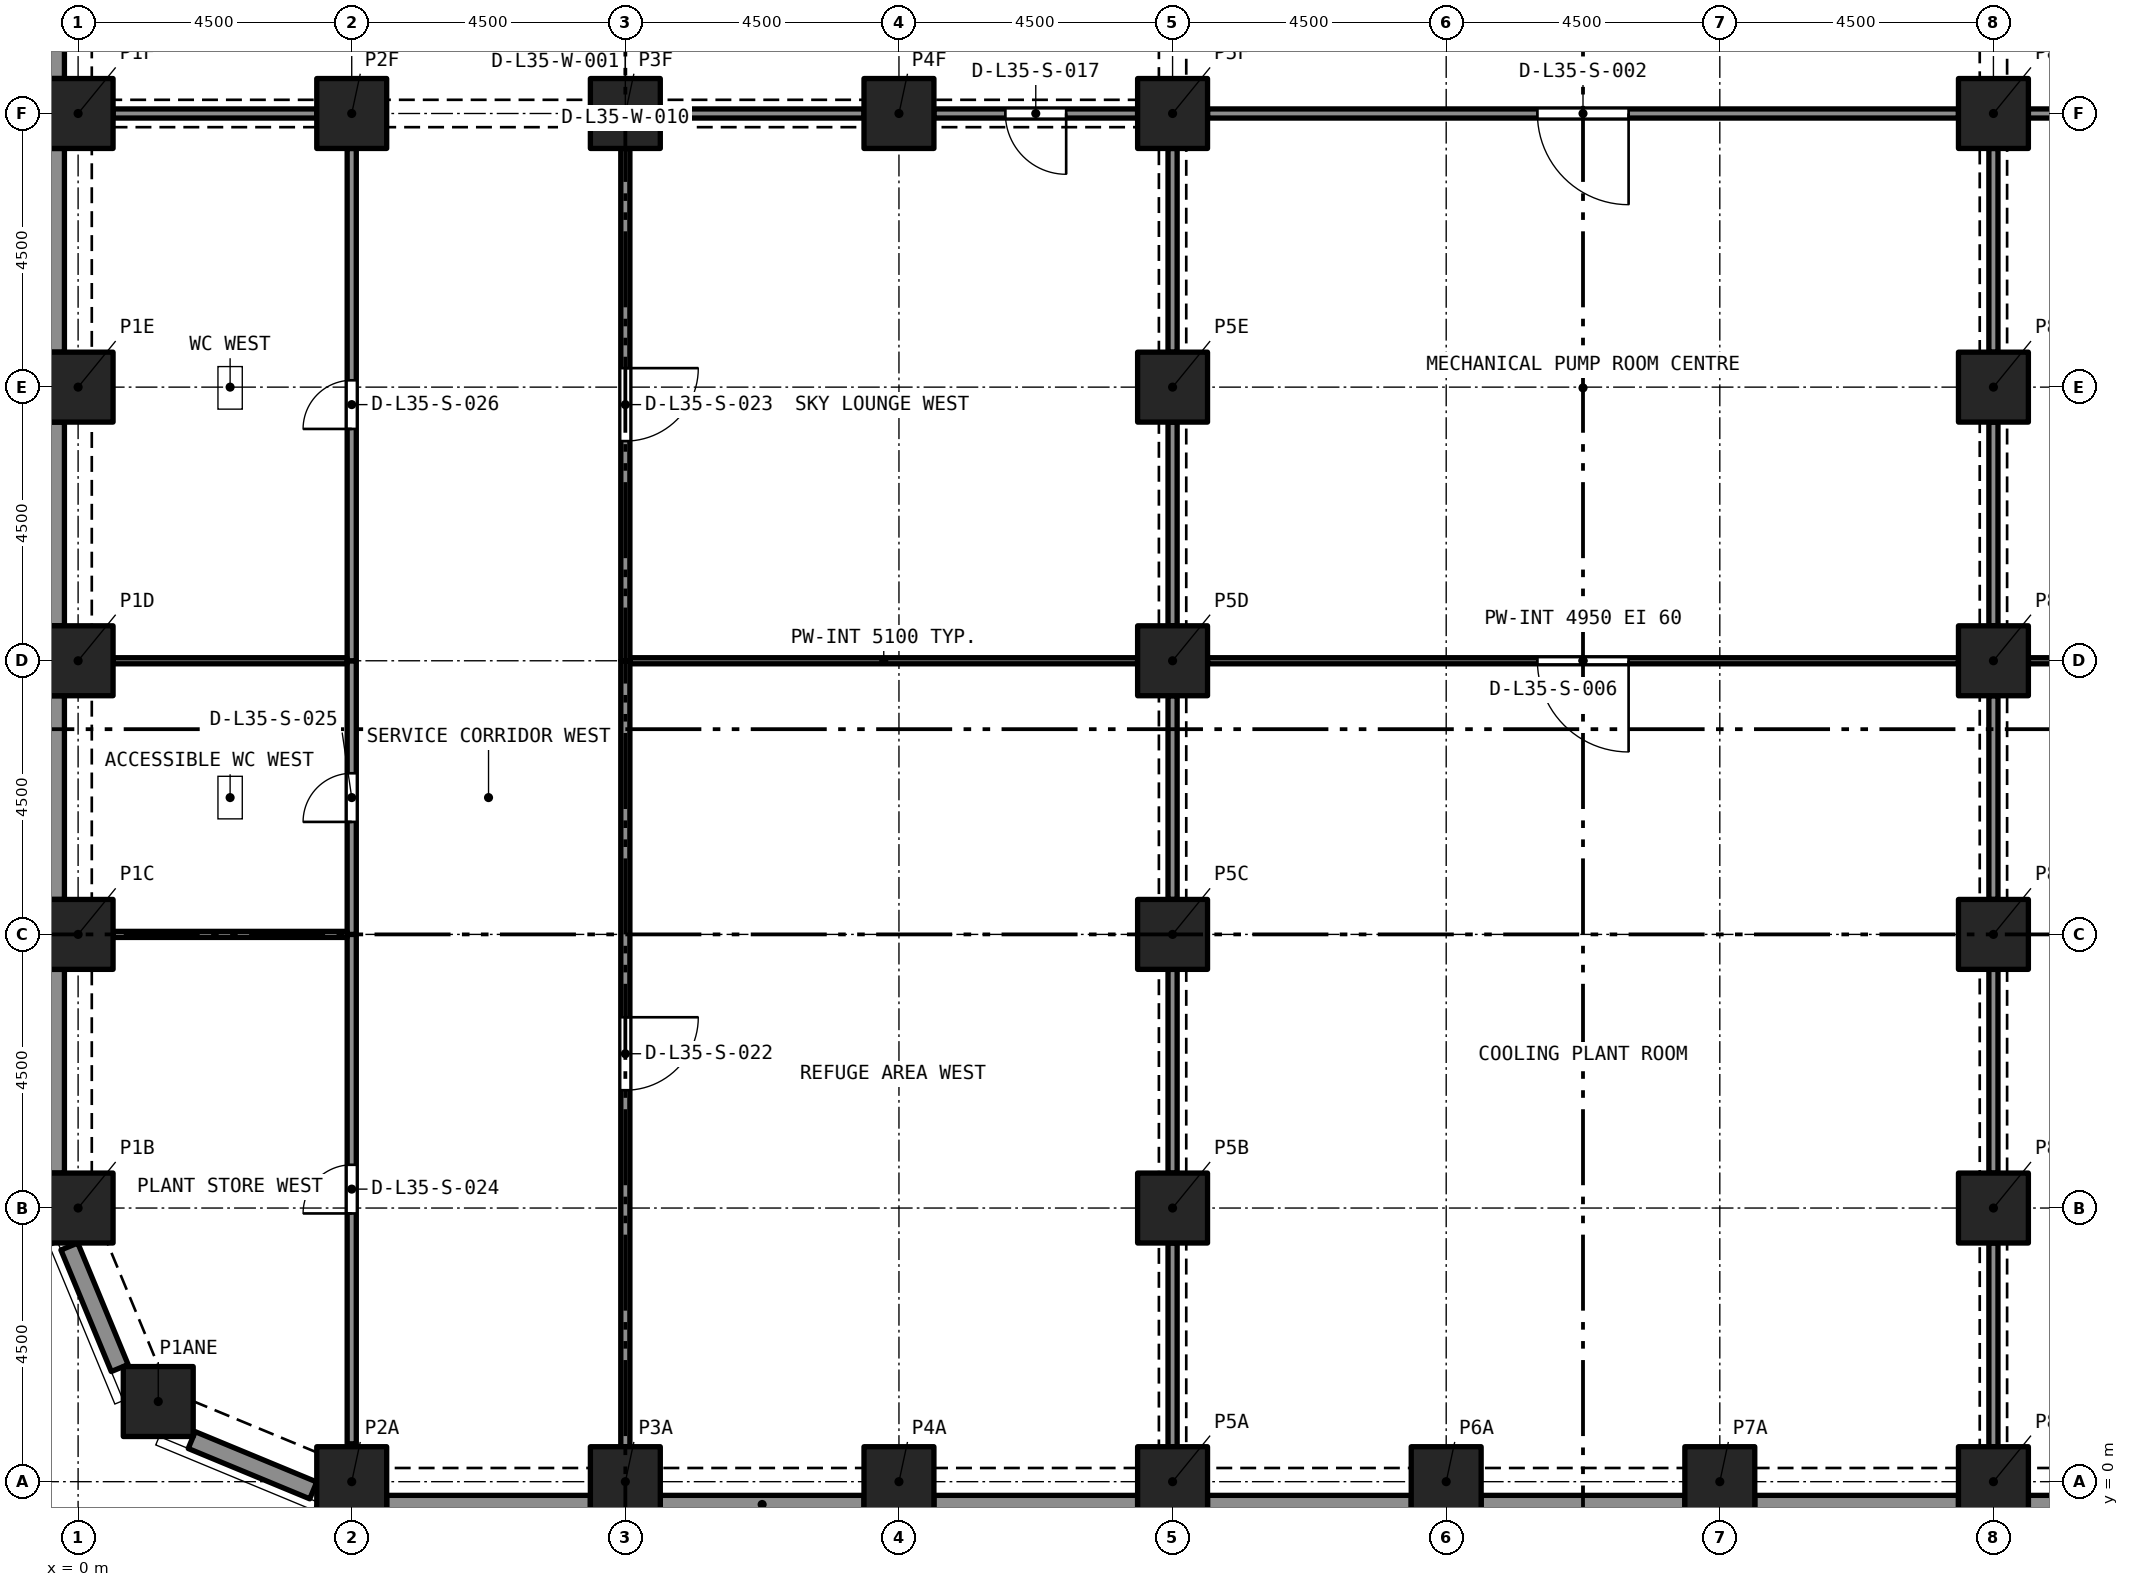
"""IFC4 building model, lengths in metres.
Left out: names, types, materials, properties, quantities, classifications, styles, units other than length and angle.
Written with IfcOpenShell. Run it as: python <this file> out.ifc"""

import sys

from ifc_helpers import new_model, si_unit, direction, frame, frame_2d, origin, origin_2d, place, context, subcontext, project, spatial, rectangle, extrude, element, fill, save


model = new_model("IFC4")
c1 = context("Model", 3, precision=1e-05, world=origin(), true_north=direction((0.0, 1.0)))
c2 = subcontext(c1, "Body", "Model", "MODEL_VIEW")
j1 = project(units=[si_unit("LENGTHUNIT", "METRE"), si_unit("PLANEANGLEUNIT", "RADIAN")], contexts=[c1])
p1 = place(None, origin())
s1 = spatial("IfcSite", under=j1, at=p1, CompositionType="ELEMENT")
p2 = place(p1, origin())
s2 = spatial("IfcBuilding", under=s1, at=p2, CompositionType="ELEMENT")
p3 = place(p2, frame((0.0, 0.0, 124.8)))
s3 = spatial("IfcBuildingStorey", under=s2, at=p3, CompositionType="ELEMENT", Elevation=124.8)
for number, where, z_axis, x_axis in (
    (1, (4.5, 0.0, 0.0), (0.0, 0.0, 1.0), (1.0, 0.0, 0.0)),
    (2, (9.0, 0.0, 0.0), (0.0, 0.0, 1.0), (1.0, 0.0, 0.0)),
    (3, (13.5, 0.0, 0.0), (0.0, 0.0, 1.0), (1.0, 0.0, 0.0)),
    (4, (18.0, 0.0, 0.0), (0.0, 0.0, 1.0), (1.0, 0.0, 0.0)),
    (5, (22.5, 0.0, 0.0), (0.0, 0.0, 1.0), (1.0, 0.0, 0.0)),
    (6, (27.0, 0.0, 0.0), (0.0, 0.0, 1.0), (1.0, 0.0, 0.0)),
    (7, (31.5, 0.0, 0.0), (0.0, 0.0, 1.0), (1.0, 0.0, 0.0)),
    (8, (1.318, 1.318, 0.0), (0.0, 0.0, 1.0), (1.0, 0.0, 0.0)),
    (9, (0.0, 4.5, 0.0), (0.0, 0.0, 1.0), (1.0, 0.0, 0.0)),
    (10, (18.0, 4.5, 0.0), (0.0, 0.0, 1.0), (1.0, 0.0, 0.0)),
    (11, (31.5, 4.5, 0.0), (0.0, 0.0, 1.0), (1.0, 0.0, 0.0)),
    (12, (0.0, 9.0, 0.0), (0.0, 0.0, 1.0), (1.0, 0.0, 0.0)),
    (13, (18.0, 9.0, 0.0), (0.0, 0.0, 1.0), (1.0, 0.0, 0.0)),
    (14, (31.5, 9.0, 0.0), (0.0, 0.0, 1.0), (1.0, 0.0, 0.0)),
    (15, (0.0, 13.5, 0.0), (0.0, 0.0, 1.0), (1.0, 0.0, 0.0)),
    (16, (18.0, 13.5, 0.0), (0.0, 0.0, 1.0), (1.0, 0.0, 0.0)),
    (17, (31.5, 13.5, 0.0), (0.0, 0.0, 1.0), (1.0, 0.0, 0.0)),
    (18, (0.0, 18.0, 0.0), (0.0, 0.0, 1.0), (1.0, 0.0, 0.0)),
    (19, (18.0, 18.0, 0.0), (0.0, 0.0, 1.0), (1.0, 0.0, 0.0)),
    (20, (31.5, 18.0, 0.0), (0.0, 0.0, 1.0), (1.0, 0.0, 0.0)),
    (21, (0.0, 22.5, 0.0), (0.0, 0.0, 1.0), (1.0, 0.0, 0.0)),
    (22, (4.5, 22.5, 0.0), (0.0, 0.0, 1.0), (1.0, 0.0, 0.0)),
    (23, (9.0, 22.5, 0.0), (0.0, 0.0, 1.0), (1.0, 0.0, 0.0)),
    (24, (13.5, 22.5, 0.0), (0.0, 0.0, 1.0), (1.0, 0.0, 0.0)),
    (25, (18.0, 22.5, 0.0), (0.0, 0.0, 1.0), (1.0, 0.0, 0.0)),
    (26, (31.5, 22.5, 0.0), (0.0, 0.0, 1.0), (1.0, 0.0, 0.0)),
):
    element("IfcColumn", number, at=place(p3, frame(where, z_axis=z_axis, x_axis=x_axis)), inside=s3, PredefinedType="COLUMN", context=c2, shape_type="SweptSolid", body=[
        extrude(rectangle(XDim=1.15, YDim=1.15, at=origin_2d()), origin(), (0.0, 0.0, 1.0), 5.4),
    ])
for number, where, z_axis, x_axis in (
    (27, (0.684, 1.869, 0.0), (0.0, 0.0, 1.0), (-0.383, 0.924, 0.0)),
    (28, (3.868, -0.144, 0.0), (0.0, 0.0, 1.0), (-0.924, 0.383, 0.0)),
):
    element("IfcWall", number, at=place(p3, frame(where, z_axis=z_axis, x_axis=x_axis)), inside=s3, PredefinedType="SOLIDWALL", context=c2, shape_type="SweptSolid", body=[
        extrude(rectangle(XDim=2.164, YDim=0.3, at=frame_2d((1.082, 0.0))), origin(), (0.0, 0.0, 1.0), 5.4),
    ])
for number, where, z_axis, x_axis in (
    (29, (8.425, -0.375, 0.0), (0.0, 0.0, 1.0), (-1.0, 0.0, 0.0)),
    (30, (12.925, -0.375, 0.0), (0.0, 0.0, 1.0), (-1.0, 0.0, 0.0)),
    (31, (17.425, -0.375, 0.0), (0.0, 0.0, 1.0), (-1.0, 0.0, 0.0)),
    (32, (21.925, -0.375, 0.0), (0.0, 0.0, 1.0), (-1.0, 0.0, 0.0)),
    (33, (26.425, -0.375, 0.0), (0.0, 0.0, 1.0), (-1.0, 0.0, 0.0)),
    (34, (30.925, -0.375, 0.0), (0.0, 0.0, 1.0), (-1.0, 0.0, 0.0)),
    (35, (35.425, -0.375, 0.0), (0.0, 0.0, 1.0), (-1.0, 0.0, 0.0)),
    (36, (-0.375, 23.075, 0.0), (0.0, 0.0, 1.0), (0.0, 1.0, 0.0)),
    (37, (-0.375, 18.575, 0.0), (0.0, 0.0, 1.0), (0.0, 1.0, 0.0)),
    (38, (-0.375, 14.075, 0.0), (0.0, 0.0, 1.0), (0.0, 1.0, 0.0)),
    (39, (-0.375, 9.575, 0.0), (0.0, 0.0, 1.0), (0.0, 1.0, 0.0)),
    (40, (-0.375, 5.075, 0.0), (0.0, 0.0, 1.0), (0.0, 1.0, 0.0)),
):
    element("IfcWall", number, at=place(p3, frame(where, z_axis=z_axis, x_axis=x_axis)), inside=s3, PredefinedType="SOLIDWALL", context=c2, shape_type="SweptSolid", body=[
        extrude(rectangle(XDim=3.35, YDim=0.3, at=frame_2d((1.675, 0.0))), origin(), (0.0, 0.0, 1.0), 5.4),
    ])
p4 = place(p3, frame((30.925, 22.5, 0.0), z_axis=(0.0, 0.0, 1.0), x_axis=(-1.0, 0.0, 0.0)))
e41 = element("IfcWall", 41, at=p4, inside=s3, PredefinedType="PARTITIONING", context=c2, shape_type="SweptSolid", body=[
    extrude(rectangle(XDim=12.35, YDim=0.15, at=frame_2d((6.175, 0.0))), origin(), (0.0, 0.0, 1.0), 4.95),
])
p5 = place(p4, frame((5.425, 0.0, 0.0)))
e42 = element("IfcOpeningElement", 42, at=p5, cuts=e41, PredefinedType="OPENING", context=c2, shape_type="SweptSolid", body=[
    extrude(rectangle(XDim=1.5, YDim=2.4, at=frame_2d((0.75, 1.2))), frame((0.0, 0.085, 0.0), z_axis=(0.0, -1.0, 0.0), x_axis=(1.0, 0.0, 0.0)), (0.0, 0.0, 1.0), 0.17),
])
p6 = place(p3, frame((30.925, 13.5, 0.0), z_axis=(0.0, 0.0, 1.0), x_axis=(-1.0, 0.0, 0.0)))
e43 = element("IfcWall", 43, at=p6, inside=s3, PredefinedType="PARTITIONING", context=c2, shape_type="SweptSolid", body=[
    extrude(rectangle(XDim=12.35, YDim=0.1, at=frame_2d((6.175, 0.0))), origin(), (0.0, 0.0, 1.0), 4.95),
])
p7 = place(p6, frame((5.425, 0.0, 0.0)))
e44 = element("IfcOpeningElement", 44, at=p7, cuts=e43, PredefinedType="OPENING", context=c2, shape_type="SweptSolid", body=[
    extrude(rectangle(XDim=1.5, YDim=2.4, at=frame_2d((0.75, 1.2))), frame((0.0, 0.06, 0.0), z_axis=(0.0, -1.0, 0.0), x_axis=(1.0, 0.0, 0.0)), (0.0, 0.0, 1.0), 0.12),
])
for number, where, z_axis, x_axis in (
    (45, (31.5, 9.575, 0.0), (0.0, 0.0, 1.0), (0.0, 1.0, 0.0)),
    (46, (31.5, 5.075, 0.0), (0.0, 0.0, 1.0), (0.0, 1.0, 0.0)),
    (47, (31.5, 0.575, 0.0), (0.0, 0.0, 1.0), (0.0, 1.0, 0.0)),
    (48, (18.0, 0.575, 0.0), (0.0, 0.0, 1.0), (0.0, 1.0, 0.0)),
    (49, (18.0, 5.075, 0.0), (0.0, 0.0, 1.0), (0.0, 1.0, 0.0)),
    (50, (18.0, 9.575, 0.0), (0.0, 0.0, 1.0), (0.0, 1.0, 0.0)),
    (51, (31.5, 18.575, 0.0), (0.0, 0.0, 1.0), (0.0, 1.0, 0.0)),
    (52, (31.5, 14.075, 0.0), (0.0, 0.0, 1.0), (0.0, 1.0, 0.0)),
    (53, (18.0, 14.075, 0.0), (0.0, 0.0, 1.0), (0.0, 1.0, 0.0)),
    (54, (18.0, 18.575, 0.0), (0.0, 0.0, 1.0), (0.0, 1.0, 0.0)),
):
    element("IfcWall", number, at=place(p3, frame(where, z_axis=z_axis, x_axis=x_axis)), inside=s3, PredefinedType="PARTITIONING", context=c2, shape_type="SweptSolid", body=[
        extrude(rectangle(XDim=3.35, YDim=0.15, at=frame_2d((1.675, 0.0))), origin(), (0.0, 0.0, 1.0), 4.58),
    ])
p8 = place(p3, frame((40.575, 22.5, 0.0), z_axis=(0.0, 0.0, 1.0), x_axis=(-1.0, 0.0, 0.0)))
e55 = element("IfcWall", 55, at=p8, inside=s3, PredefinedType="PARTITIONING", context=c2, shape_type="SweptSolid", body=[
    extrude(rectangle(XDim=8.5, YDim=0.15, at=frame_2d((4.25, 0.0))), origin(), (0.0, 0.0, 1.0), 5.1),
])
p9 = place(p8, frame((3.788, 0.0, 0.0)))
e56 = element("IfcOpeningElement", 56, at=p9, cuts=e55, PredefinedType="OPENING", context=c2, shape_type="SweptSolid", body=[
    extrude(rectangle(XDim=1.0, YDim=2.1, at=frame_2d((0.5, 1.05))), frame((0.0, 0.085, 0.0), z_axis=(0.0, -1.0, 0.0), x_axis=(1.0, 0.0, 0.0)), (0.0, 0.0, 1.0), 0.17),
])
p10 = place(p3, frame((32.075, 13.5, 0.0), z_axis=(0.0, 0.0, 1.0), x_axis=(1.0, 0.0, 0.0)))
e57 = element("IfcWall", 57, at=p10, inside=s3, PredefinedType="PARTITIONING", context=c2, shape_type="SweptSolid", body=[
    extrude(rectangle(XDim=8.35, YDim=0.1, at=frame_2d((4.175, 0.0))), origin(), (0.0, 0.0, 1.0), 5.1),
])
p11 = place(p3, frame((17.425, 22.5, 0.0), z_axis=(0.0, 0.0, 1.0), x_axis=(-1.0, 0.0, 0.0)))
e58 = element("IfcWall", 58, at=p11, inside=s3, PredefinedType="PARTITIONING", context=c2, shape_type="SweptSolid", body=[
    extrude(rectangle(XDim=3.35, YDim=0.15, at=frame_2d((1.675, 0.0))), origin(), (0.0, 0.0, 1.0), 4.58),
])
p12 = place(p11, frame((1.175, 0.0, 0.0)))
e59 = element("IfcOpeningElement", 59, at=p12, cuts=e58, PredefinedType="OPENING", context=c2, shape_type="SweptSolid", body=[
    extrude(rectangle(XDim=1.0, YDim=2.1, at=frame_2d((0.5, 1.05))), frame((0.0, 0.085, 0.0), z_axis=(0.0, -1.0, 0.0), x_axis=(1.0, 0.0, 0.0)), (0.0, 0.0, 1.0), 0.17),
])
for number, where, z_axis, x_axis in (
    (60, (9.575, 22.5, 0.0), (0.0, 0.0, 1.0), (1.0, 0.0, 0.0)),
    (61, (0.575, 22.5, 0.0), (0.0, 0.0, 1.0), (1.0, 0.0, 0.0)),
):
    element("IfcWall", number, at=place(p3, frame(where, z_axis=z_axis, x_axis=x_axis)), inside=s3, PredefinedType="PARTITIONING", context=c2, shape_type="SweptSolid", body=[
        extrude(rectangle(XDim=3.35, YDim=0.15, at=frame_2d((1.675, 0.0))), origin(), (0.0, 0.0, 1.0), 4.58),
    ])
p13 = place(p3, frame((9.075, 13.5, 0.0), z_axis=(0.0, 0.0, 1.0), x_axis=(1.0, 0.0, 0.0)))
e62 = element("IfcWall", 62, at=p13, inside=s3, PredefinedType="PARTITIONING", context=c2, shape_type="SweptSolid", body=[
    extrude(rectangle(XDim=8.35, YDim=0.1, at=frame_2d((4.175, 0.0))), origin(), (0.0, 0.0, 1.0), 5.1),
])
p14 = place(p3, frame((9.0, 13.5, 0.0), z_axis=(0.0, 0.0, 1.0), x_axis=(0.0, -1.0, 0.0)))
e63 = element("IfcWall", 63, at=p14, inside=s3, PredefinedType="PARTITIONING", context=c2, shape_type="SweptSolid", body=[
    extrude(rectangle(XDim=12.925, YDim=0.15, at=frame_2d((6.462, 0.0))), origin(), (0.0, 0.0, 1.0), 5.1),
])
p15 = place(p14, frame((5.863, 0.0, 0.0)))
e64 = element("IfcOpeningElement", 64, at=p15, cuts=e63, PredefinedType="OPENING", context=c2, shape_type="SweptSolid", body=[
    extrude(rectangle(XDim=1.2, YDim=2.1, at=frame_2d((0.6, 1.05))), frame((0.0, 0.085, 0.0), z_axis=(0.0, -1.0, 0.0), x_axis=(1.0, 0.0, 0.0)), (0.0, 0.0, 1.0), 0.17),
])
p16 = place(p3, frame((9.0, 21.925, 0.0), z_axis=(0.0, 0.0, 1.0), x_axis=(0.0, -1.0, 0.0)))
e65 = element("IfcWall", 65, at=p16, inside=s3, PredefinedType="PARTITIONING", context=c2, shape_type="SweptSolid", body=[
    extrude(rectangle(XDim=8.425, YDim=0.15, at=frame_2d((4.212, 0.0))), origin(), (0.0, 0.0, 1.0), 5.1),
])
p17 = place(p16, frame((3.613, 0.0, 0.0)))
e66 = element("IfcOpeningElement", 66, at=p17, cuts=e65, PredefinedType="OPENING", context=c2, shape_type="SweptSolid", body=[
    extrude(rectangle(XDim=1.2, YDim=2.1, at=frame_2d((0.6, 1.05))), frame((0.0, 0.085, 0.0), z_axis=(0.0, -1.0, 0.0), x_axis=(1.0, 0.0, 0.0)), (0.0, 0.0, 1.0), 0.17),
])
p18 = place(p3, frame((4.5, 0.622, 0.0), z_axis=(0.0, 0.0, 1.0), x_axis=(0.0, 1.0, 0.0)))
e67 = element("IfcWall", 67, at=p18, inside=s3, PredefinedType="PARTITIONING", context=c2, shape_type="SweptSolid", body=[
    extrude(rectangle(XDim=8.378, YDim=0.15, at=frame_2d((4.189, 0.0))), origin(), (0.0, 0.0, 1.0), 5.1),
])
p19 = place(p18, frame((3.789, 0.0, 0.0)))
e68 = element("IfcOpeningElement", 68, at=p19, cuts=e67, PredefinedType="OPENING", context=c2, shape_type="SweptSolid", body=[
    extrude(rectangle(XDim=0.8, YDim=2.1, at=frame_2d((0.4, 1.05))), frame((0.0, 0.085, 0.0), z_axis=(0.0, -1.0, 0.0), x_axis=(1.0, 0.0, 0.0)), (0.0, 0.0, 1.0), 0.17),
])
p20 = place(p3, frame((4.5, 9.0, 0.0), z_axis=(0.0, 0.0, 1.0), x_axis=(0.0, 1.0, 0.0)))
e69 = element("IfcWall", 69, at=p20, inside=s3, PredefinedType="PARTITIONING", context=c2, shape_type="SweptSolid", body=[
    extrude(rectangle(XDim=4.5, YDim=0.15, at=frame_2d((2.25, 0.0))), origin(), (0.0, 0.0, 1.0), 5.1),
])
p21 = place(p20, frame((1.85, 0.0, 0.0)))
e70 = element("IfcOpeningElement", 70, at=p21, cuts=e69, PredefinedType="OPENING", context=c2, shape_type="SweptSolid", body=[
    extrude(rectangle(XDim=0.8, YDim=2.1, at=frame_2d((0.4, 1.05))), frame((0.0, 0.085, 0.0), z_axis=(0.0, -1.0, 0.0), x_axis=(1.0, 0.0, 0.0)), (0.0, 0.0, 1.0), 0.17),
])
p22 = place(p3, frame((4.5, 13.5, 0.0), z_axis=(0.0, 0.0, 1.0), x_axis=(0.0, 1.0, 0.0)))
e71 = element("IfcWall", 71, at=p22, inside=s3, PredefinedType="PARTITIONING", context=c2, shape_type="SweptSolid", body=[
    extrude(rectangle(XDim=8.425, YDim=0.15, at=frame_2d((4.212, 0.0))), origin(), (0.0, 0.0, 1.0), 5.1),
])
p23 = place(p22, frame((3.812, 0.0, 0.0)))
e72 = element("IfcOpeningElement", 72, at=p23, cuts=e71, PredefinedType="OPENING", context=c2, shape_type="SweptSolid", body=[
    extrude(rectangle(XDim=0.8, YDim=2.1, at=frame_2d((0.4, 1.05))), frame((0.0, 0.085, 0.0), z_axis=(0.0, -1.0, 0.0), x_axis=(1.0, 0.0, 0.0)), (0.0, 0.0, 1.0), 0.17),
])
for number, where, z_axis, x_axis in (
    (73, (0.575, 9.0, 0.0), (0.0, 0.0, 1.0), (1.0, 0.0, 0.0)),
    (74, (0.575, 13.5, 0.0), (0.0, 0.0, 1.0), (1.0, 0.0, 0.0)),
):
    element("IfcWall", number, at=place(p3, frame(where, z_axis=z_axis, x_axis=x_axis)), inside=s3, PredefinedType="PARTITIONING", context=c2, shape_type="SweptSolid", body=[
        extrude(rectangle(XDim=3.85, YDim=0.1, at=frame_2d((1.925, 0.0))), origin(), (0.0, 0.0, 1.0), 5.1),
    ])
p24 = place(p5, origin())
e75 = element("IfcDoor", 75, at=p24, inside=s3, OperationType="DOUBLE_DOOR_SINGLE_SWING", PredefinedType="DOOR", context=c2, shape_type="SweptSolid", body=[
    extrude(rectangle(XDim=1.5, YDim=2.4, at=frame_2d((0.75, 1.2))), frame((0.0, 0.025, 0.0), z_axis=(0.0, -1.0, 0.0), x_axis=(1.0, 0.0, 0.0)), (0.0, 0.0, 1.0), 0.05),
])
fill(e42, e75)
p25 = place(p7, origin())
e76 = element("IfcDoor", 76, at=p25, inside=s3, OperationType="DOUBLE_DOOR_SINGLE_SWING", PredefinedType="DOOR", context=c2, shape_type="SweptSolid", body=[
    extrude(rectangle(XDim=1.5, YDim=2.4, at=frame_2d((0.75, 1.2))), frame((0.0, 0.025, 0.0), z_axis=(0.0, -1.0, 0.0), x_axis=(1.0, 0.0, 0.0)), (0.0, 0.0, 1.0), 0.05),
])
fill(e44, e76)
p26 = place(p12, origin())
e77 = element("IfcDoor", 77, at=p26, inside=s3, OperationType="SINGLE_SWING_RIGHT", PredefinedType="DOOR", context=c2, shape_type="SweptSolid", body=[
    extrude(rectangle(XDim=1.0, YDim=2.1, at=frame_2d((0.5, 1.05))), frame((0.0, 0.025, 0.0), z_axis=(0.0, -1.0, 0.0), x_axis=(1.0, 0.0, 0.0)), (0.0, 0.0, 1.0), 0.05),
])
fill(e59, e77)
p27 = place(p15, origin())
e78 = element("IfcDoor", 78, at=p27, inside=s3, OperationType="SINGLE_SWING_RIGHT", PredefinedType="DOOR", context=c2, shape_type="SweptSolid", body=[
    extrude(rectangle(XDim=1.2, YDim=2.1, at=frame_2d((0.6, 1.05))), frame((0.0, 0.025, 0.0), z_axis=(0.0, -1.0, 0.0), x_axis=(1.0, 0.0, 0.0)), (0.0, 0.0, 1.0), 0.05),
])
fill(e64, e78)
p28 = place(p17, origin())
e79 = element("IfcDoor", 79, at=p28, inside=s3, OperationType="SINGLE_SWING_RIGHT", PredefinedType="DOOR", context=c2, shape_type="SweptSolid", body=[
    extrude(rectangle(XDim=1.2, YDim=2.1, at=frame_2d((0.6, 1.05))), frame((0.0, 0.025, 0.0), z_axis=(0.0, -1.0, 0.0), x_axis=(1.0, 0.0, 0.0)), (0.0, 0.0, 1.0), 0.05),
])
fill(e66, e79)
p29 = place(p19, origin())
e80 = element("IfcDoor", 80, at=p29, inside=s3, OperationType="SINGLE_SWING_RIGHT", PredefinedType="DOOR", context=c2, shape_type="SweptSolid", body=[
    extrude(rectangle(XDim=0.8, YDim=2.1, at=frame_2d((0.4, 1.05))), frame((0.0, 0.025, 0.0), z_axis=(0.0, -1.0, 0.0), x_axis=(1.0, 0.0, 0.0)), (0.0, 0.0, 1.0), 0.05),
])
fill(e68, e80)
p30 = place(p21, origin())
e81 = element("IfcDoor", 81, at=p30, inside=s3, OperationType="SINGLE_SWING_RIGHT", PredefinedType="DOOR", context=c2, shape_type="SweptSolid", body=[
    extrude(rectangle(XDim=0.8, YDim=2.1, at=frame_2d((0.4, 1.05))), frame((0.0, 0.025, 0.0), z_axis=(0.0, -1.0, 0.0), x_axis=(1.0, 0.0, 0.0)), (0.0, 0.0, 1.0), 0.05),
])
fill(e70, e81)
p31 = place(p23, origin())
e82 = element("IfcDoor", 82, at=p31, inside=s3, OperationType="SINGLE_SWING_LEFT", PredefinedType="DOOR", context=c2, shape_type="SweptSolid", body=[
    extrude(rectangle(XDim=0.8, YDim=2.1, at=frame_2d((0.4, 1.05))), frame((0.0, 0.025, 0.0), z_axis=(0.0, -1.0, 0.0), x_axis=(1.0, 0.0, 0.0)), (0.0, 0.0, 1.0), 0.05),
])
fill(e72, e82)
save(model, sys.argv[1])
